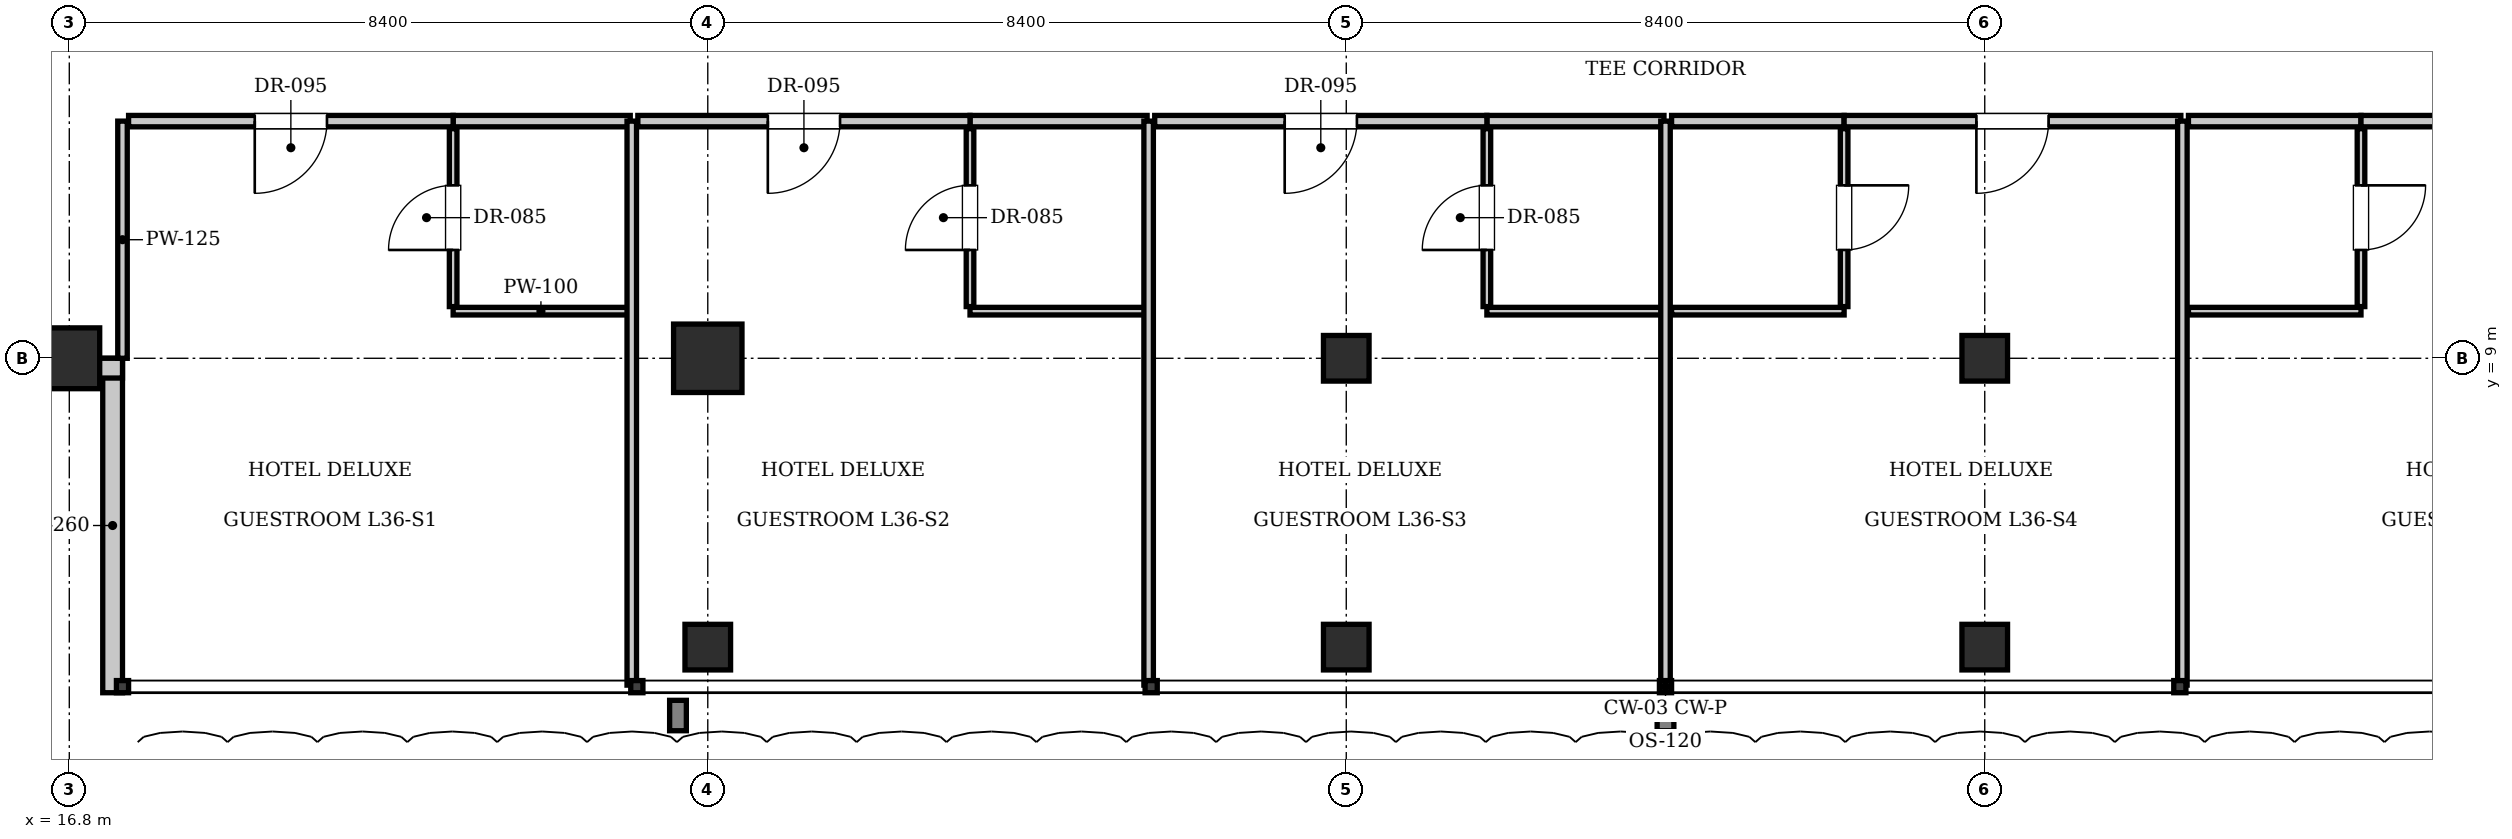
"""IFC4 building model, lengths in metres.
Left out: names, types, materials, properties, quantities, classifications, styles, units other than length and angle.
Written with IfcOpenShell. Run it as: python <this file> out.ifc"""

import sys

from ifc_helpers import new_model, si_unit, direction, frame, frame_2d, origin, origin_2d, place, context, subcontext, project, spatial, rectangle, i_section, extrude, element, fill, save


model = new_model("IFC4")
c1 = context("Model", 3, precision=1e-05, world=origin(), true_north=direction((0.0, 1.0)))
c2 = subcontext(c1, "Body", "Model", "MODEL_VIEW")
j1 = project(units=[si_unit("LENGTHUNIT", "METRE"), si_unit("PLANEANGLEUNIT", "RADIAN")], contexts=[c1])
p1 = place(None, origin())
s1 = spatial("IfcSite", under=j1, at=p1, CompositionType="ELEMENT")
p2 = place(p1, origin())
s2 = spatial("IfcBuilding", under=s1, at=p2, CompositionType="ELEMENT")
p3 = place(p2, frame((0.0, 0.0, 150.5)))
s3 = spatial("IfcBuildingStorey", under=s2, at=p3, CompositionType="ELEMENT", Elevation=150.5)
p4 = place(p3, frame((25.2, 9.0, 0.0), z_axis=(0.0, 0.0, 1.0), x_axis=(1.0, 0.0, 0.0)))
e1 = element("IfcColumn", 1, at=p4, inside=s3, PredefinedType="COLUMN", context=c2, shape_type="SweptSolid", body=[
    extrude(rectangle(XDim=0.9, YDim=0.9, at=origin_2d()), origin(), (0.0, 0.0, 1.0), 3.85),
])
for number, where, z_axis, x_axis in (
    (2, (33.6, 9.0, 0.0), (0.0, 0.0, 1.0), (1.0, 0.0, 0.0)),
    (3, (42.0, 9.0, 0.0), (0.0, 0.0, 1.0), (1.0, 0.0, 0.0)),
):
    element("IfcColumn", number, at=place(p3, frame(where, z_axis=z_axis, x_axis=x_axis)), inside=s3, PredefinedType="COLUMN", context=c2, shape_type="SweptSolid", body=[
        extrude(i_section(OverallWidth=0.6, OverallDepth=0.6, WebThickness=0.025, FlangeThickness=0.038, at=origin_2d()), origin(), (0.0, 0.0, 1.0), 3.85),
    ])
p5 = place(p3, frame((16.8, 9.0, 0.0), z_axis=(0.0, 0.0, 1.0), x_axis=(1.0, 0.0, 0.0)))
e4 = element("IfcColumn", 4, at=p5, inside=s3, PredefinedType="COLUMN", context=c2, shape_type="SweptSolid", body=[
    extrude(rectangle(XDim=0.8, YDim=0.8, at=origin_2d()), origin(), (0.0, 0.0, 1.0), 3.85),
])
for number, where, z_axis, x_axis in (
    (5, (25.2, 5.2, 0.0), (0.0, 0.0, 1.0), (1.0, 0.0, 0.0)),
    (6, (33.6, 5.2, 0.0), (0.0, 0.0, 1.0), (1.0, 0.0, 0.0)),
    (7, (42.0, 5.2, 0.0), (0.0, 0.0, 1.0), (1.0, 0.0, 0.0)),
):
    element("IfcColumn", number, at=place(p3, frame(where, z_axis=z_axis, x_axis=x_axis)), inside=s3, PredefinedType="COLUMN", context=c2, shape_type="SweptSolid", body=[
        extrude(i_section(OverallWidth=0.6, OverallDepth=0.6, WebThickness=0.025, FlangeThickness=0.038, at=origin_2d()), origin(), (0.0, 0.0, 1.0), 3.85),
    ])
p6 = place(p3, frame((17.37, 4.6, 0.0), z_axis=(0.0, 0.0, 1.0), x_axis=(0.0, 1.0, 0.0)))
e8 = element("IfcWall", 8, at=p6, inside=s3, PredefinedType="SOLIDWALL", context=c2, shape_type="SweptSolid", body=[
    extrude(rectangle(XDim=4.4, YDim=0.26, at=frame_2d((2.2, 0.0))), origin(), (0.0, 0.0, 1.0), 3.61),
])
p7 = place(p3, frame((17.5, 8.87, 0.0), z_axis=(0.0, 0.0, 1.0), x_axis=(-1.0, 0.0, 0.0)))
e9 = element("IfcWall", 9, at=p7, inside=s3, PredefinedType="SOLIDWALL", context=c2, shape_type="SweptSolid", body=[
    extrude(rectangle(XDim=4.4, YDim=0.26, at=frame_2d((2.2, 0.0))), origin(), (0.0, 0.0, 1.0), 2.998),
])
p8 = place(p3, frame((17.5, 9.0, 0.0), z_axis=(0.0, 0.0, 1.0), x_axis=(0.0, 1.0, 0.0)))
e10 = element("IfcWall", 10, at=p8, inside=s3, PredefinedType="PARTITIONING", context=c2, shape_type="SweptSolid", body=[
    extrude(rectangle(XDim=3.12, YDim=0.125, at=frame_2d((1.56, 0.0))), origin(), (0.0, 0.0, 1.0), 3.61),
])
p9 = place(p3, frame((21.85, 12.12, 0.0), z_axis=(0.0, 0.0, 1.0), x_axis=(1.0, 0.0, 0.0)))
e11 = element("IfcWall", 11, at=p9, inside=s3, PredefinedType="PARTITIONING", context=c2, shape_type="SweptSolid", body=[
    extrude(rectangle(XDim=2.33, YDim=0.15, at=frame_2d((1.165, 0.0))), origin(), (0.0, 0.0, 1.0), 3.61),
])
p10 = place(p3, frame((21.85, 9.62, 0.0), z_axis=(0.0, 0.0, 1.0), x_axis=(1.0, 0.0, 0.0)))
e12 = element("IfcWall", 12, at=p10, inside=s3, PredefinedType="PARTITIONING", context=c2, shape_type="SweptSolid", body=[
    extrude(rectangle(XDim=2.31, YDim=0.1, at=frame_2d((1.155, 0.0))), origin(), (0.0, 0.0, 1.0), 3.61),
])
p11 = place(p3, frame((21.85, 9.68, 0.0), z_axis=(0.0, 0.0, 1.0), x_axis=(0.0, 1.0, 0.0)))
e13 = element("IfcWall", 13, at=p11, inside=s3, PredefinedType="PARTITIONING", context=c2, shape_type="SweptSolid", body=[
    extrude(rectangle(XDim=2.34, YDim=0.1, at=frame_2d((1.17, 0.0))), origin(), (0.0, 0.0, 1.0), 3.61),
])
p12 = place(p11, frame((0.745, 0.0, 0.0)))
e14 = element("IfcOpeningElement", 14, at=p12, cuts=e13, PredefinedType="OPENING", context=c2, shape_type="SweptSolid", body=[
    extrude(rectangle(XDim=0.85, YDim=2.1, at=frame_2d((0.425, 1.05))), frame((0.0, 0.06, 0.0), z_axis=(0.0, -1.0, 0.0), x_axis=(1.0, 0.0, 0.0)), (0.0, 0.0, 1.0), 0.12),
])
p13 = place(p3, frame((17.58, 12.12, 0.0), z_axis=(0.0, 0.0, 1.0), x_axis=(1.0, 0.0, 0.0)))
e15 = element("IfcWall", 15, at=p13, inside=s3, PredefinedType="PARTITIONING", context=c2, shape_type="SweptSolid", body=[
    extrude(rectangle(XDim=4.27, YDim=0.15, at=frame_2d((2.135, 0.0))), origin(), (0.0, 0.0, 1.0), 3.61),
])
p14 = place(p13, frame((1.66, 0.0, 0.0)))
e16 = element("IfcOpeningElement", 16, at=p14, cuts=e15, PredefinedType="OPENING", context=c2, shape_type="SweptSolid", body=[
    extrude(rectangle(XDim=0.95, YDim=2.15, at=frame_2d((0.475, 1.075))), frame((0.0, 0.085, 0.0), z_axis=(0.0, -1.0, 0.0), x_axis=(1.0, 0.0, 0.0)), (0.0, 0.0, 1.0), 0.17),
])
p15 = place(p3, frame((24.2, 4.7, 0.0), z_axis=(0.0, 0.0, 1.0), x_axis=(0.0, 1.0, 0.0)))
e17 = element("IfcWall", 17, at=p15, inside=s3, PredefinedType="PARTITIONING", context=c2, shape_type="SweptSolid", body=[
    extrude(rectangle(XDim=7.42, YDim=0.125, at=frame_2d((3.71, 0.0))), origin(), (0.0, 0.0, 1.0), 3.61),
])
p16 = place(p3, frame((28.65, 12.12, 0.0), z_axis=(0.0, 0.0, 1.0), x_axis=(1.0, 0.0, 0.0)))
e18 = element("IfcWall", 18, at=p16, inside=s3, PredefinedType="PARTITIONING", context=c2, shape_type="SweptSolid", body=[
    extrude(rectangle(XDim=2.33, YDim=0.15, at=frame_2d((1.165, 0.0))), origin(), (0.0, 0.0, 1.0), 3.61),
])
p17 = place(p3, frame((28.65, 9.62, 0.0), z_axis=(0.0, 0.0, 1.0), x_axis=(1.0, 0.0, 0.0)))
e19 = element("IfcWall", 19, at=p17, inside=s3, PredefinedType="PARTITIONING", context=c2, shape_type="SweptSolid", body=[
    extrude(rectangle(XDim=2.31, YDim=0.1, at=frame_2d((1.155, 0.0))), origin(), (0.0, 0.0, 1.0), 3.61),
])
p18 = place(p3, frame((28.65, 9.68, 0.0), z_axis=(0.0, 0.0, 1.0), x_axis=(0.0, 1.0, 0.0)))
e20 = element("IfcWall", 20, at=p18, inside=s3, PredefinedType="PARTITIONING", context=c2, shape_type="SweptSolid", body=[
    extrude(rectangle(XDim=2.34, YDim=0.1, at=frame_2d((1.17, 0.0))), origin(), (0.0, 0.0, 1.0), 3.61),
])
p19 = place(p18, frame((0.745, 0.0, 0.0)))
e21 = element("IfcOpeningElement", 21, at=p19, cuts=e20, PredefinedType="OPENING", context=c2, shape_type="SweptSolid", body=[
    extrude(rectangle(XDim=0.85, YDim=2.1, at=frame_2d((0.425, 1.05))), frame((0.0, 0.06, 0.0), z_axis=(0.0, -1.0, 0.0), x_axis=(1.0, 0.0, 0.0)), (0.0, 0.0, 1.0), 0.12),
])
p20 = place(p3, frame((24.28, 12.12, 0.0), z_axis=(0.0, 0.0, 1.0), x_axis=(1.0, 0.0, 0.0)))
e22 = element("IfcWall", 22, at=p20, inside=s3, PredefinedType="PARTITIONING", context=c2, shape_type="SweptSolid", body=[
    extrude(rectangle(XDim=4.37, YDim=0.15, at=frame_2d((2.185, 0.0))), origin(), (0.0, 0.0, 1.0), 3.61),
])
p21 = place(p20, frame((1.71, 0.0, 0.0)))
e23 = element("IfcOpeningElement", 23, at=p21, cuts=e22, PredefinedType="OPENING", context=c2, shape_type="SweptSolid", body=[
    extrude(rectangle(XDim=0.95, YDim=2.15, at=frame_2d((0.475, 1.075))), frame((0.0, 0.085, 0.0), z_axis=(0.0, -1.0, 0.0), x_axis=(1.0, 0.0, 0.0)), (0.0, 0.0, 1.0), 0.17),
])
p22 = place(p3, frame((31.0, 4.7, 0.0), z_axis=(0.0, 0.0, 1.0), x_axis=(0.0, 1.0, 0.0)))
e24 = element("IfcWall", 24, at=p22, inside=s3, PredefinedType="PARTITIONING", context=c2, shape_type="SweptSolid", body=[
    extrude(rectangle(XDim=7.42, YDim=0.125, at=frame_2d((3.71, 0.0))), origin(), (0.0, 0.0, 1.0), 3.61),
])
p23 = place(p3, frame((35.45, 12.12, 0.0), z_axis=(0.0, 0.0, 1.0), x_axis=(1.0, 0.0, 0.0)))
e25 = element("IfcWall", 25, at=p23, inside=s3, PredefinedType="PARTITIONING", context=c2, shape_type="SweptSolid", body=[
    extrude(rectangle(XDim=2.33, YDim=0.15, at=frame_2d((1.165, 0.0))), origin(), (0.0, 0.0, 1.0), 3.61),
])
p24 = place(p3, frame((35.45, 9.62, 0.0), z_axis=(0.0, 0.0, 1.0), x_axis=(1.0, 0.0, 0.0)))
e26 = element("IfcWall", 26, at=p24, inside=s3, PredefinedType="PARTITIONING", context=c2, shape_type="SweptSolid", body=[
    extrude(rectangle(XDim=2.31, YDim=0.1, at=frame_2d((1.155, 0.0))), origin(), (0.0, 0.0, 1.0), 3.61),
])
p25 = place(p3, frame((35.45, 9.68, 0.0), z_axis=(0.0, 0.0, 1.0), x_axis=(0.0, 1.0, 0.0)))
e27 = element("IfcWall", 27, at=p25, inside=s3, PredefinedType="PARTITIONING", context=c2, shape_type="SweptSolid", body=[
    extrude(rectangle(XDim=2.34, YDim=0.1, at=frame_2d((1.17, 0.0))), origin(), (0.0, 0.0, 1.0), 3.61),
])
p26 = place(p25, frame((0.745, 0.0, 0.0)))
e28 = element("IfcOpeningElement", 28, at=p26, cuts=e27, PredefinedType="OPENING", context=c2, shape_type="SweptSolid", body=[
    extrude(rectangle(XDim=0.85, YDim=2.1, at=frame_2d((0.425, 1.05))), frame((0.0, 0.06, 0.0), z_axis=(0.0, -1.0, 0.0), x_axis=(1.0, 0.0, 0.0)), (0.0, 0.0, 1.0), 0.12),
])
p27 = place(p3, frame((31.08, 12.12, 0.0), z_axis=(0.0, 0.0, 1.0), x_axis=(1.0, 0.0, 0.0)))
e29 = element("IfcWall", 29, at=p27, inside=s3, PredefinedType="PARTITIONING", context=c2, shape_type="SweptSolid", body=[
    extrude(rectangle(XDim=4.37, YDim=0.15, at=frame_2d((2.185, 0.0))), origin(), (0.0, 0.0, 1.0), 3.61),
])
p28 = place(p27, frame((1.71, 0.0, 0.0)))
e30 = element("IfcOpeningElement", 30, at=p28, cuts=e29, PredefinedType="OPENING", context=c2, shape_type="SweptSolid", body=[
    extrude(rectangle(XDim=0.95, YDim=2.15, at=frame_2d((0.475, 1.075))), frame((0.0, 0.085, 0.0), z_axis=(0.0, -1.0, 0.0), x_axis=(1.0, 0.0, 0.0)), (0.0, 0.0, 1.0), 0.17),
])
p29 = place(p3, frame((37.8, 4.7, 0.0), z_axis=(0.0, 0.0, 1.0), x_axis=(0.0, 1.0, 0.0)))
e31 = element("IfcWall", 31, at=p29, inside=s3, PredefinedType="PARTITIONING", context=c2, shape_type="SweptSolid", body=[
    extrude(rectangle(XDim=7.42, YDim=0.125, at=frame_2d((3.71, 0.0))), origin(), (0.0, 0.0, 1.0), 3.293),
])
p30 = place(p3, frame((37.88, 12.12, 0.0), z_axis=(0.0, 0.0, 1.0), x_axis=(1.0, 0.0, 0.0)))
e32 = element("IfcWall", 32, at=p30, inside=s3, PredefinedType="PARTITIONING", context=c2, shape_type="SweptSolid", body=[
    extrude(rectangle(XDim=2.27, YDim=0.15, at=frame_2d((1.135, 0.0))), origin(), (0.0, 0.0, 1.0), 3.61),
])
p31 = place(p3, frame((37.88, 9.62, 0.0), z_axis=(0.0, 0.0, 1.0), x_axis=(1.0, 0.0, 0.0)))
e33 = element("IfcWall", 33, at=p31, inside=s3, PredefinedType="PARTITIONING", context=c2, shape_type="SweptSolid", body=[
    extrude(rectangle(XDim=2.27, YDim=0.1, at=frame_2d((1.135, 0.0))), origin(), (0.0, 0.0, 1.0), 3.61),
])
p32 = place(p3, frame((40.15, 9.68, 0.0), z_axis=(0.0, 0.0, 1.0), x_axis=(0.0, 1.0, 0.0)))
e34 = element("IfcWall", 34, at=p32, inside=s3, PredefinedType="PARTITIONING", context=c2, shape_type="SweptSolid", body=[
    extrude(rectangle(XDim=2.34, YDim=0.1, at=frame_2d((1.17, 0.0))), origin(), (0.0, 0.0, 1.0), 3.61),
])
p33 = place(p32, frame((0.745, 0.0, 0.0)))
e35 = element("IfcOpeningElement", 35, at=p33, cuts=e34, PredefinedType="OPENING", context=c2, shape_type="SweptSolid", body=[
    extrude(rectangle(XDim=0.85, YDim=2.1, at=frame_2d((0.425, 1.05))), frame((0.0, 0.06, 0.0), z_axis=(0.0, -1.0, 0.0), x_axis=(1.0, 0.0, 0.0)), (0.0, 0.0, 1.0), 0.12),
])
p34 = place(p3, frame((40.15, 12.12, 0.0), z_axis=(0.0, 0.0, 1.0), x_axis=(1.0, 0.0, 0.0)))
e36 = element("IfcWall", 36, at=p34, inside=s3, PredefinedType="PARTITIONING", context=c2, shape_type="SweptSolid", body=[
    extrude(rectangle(XDim=4.43, YDim=0.15, at=frame_2d((2.215, 0.0))), origin(), (0.0, 0.0, 1.0), 3.61),
])
p35 = place(p34, frame((1.74, 0.0, 0.0)))
e37 = element("IfcOpeningElement", 37, at=p35, cuts=e36, PredefinedType="OPENING", context=c2, shape_type="SweptSolid", body=[
    extrude(rectangle(XDim=0.95, YDim=2.15, at=frame_2d((0.475, 1.075))), frame((0.0, 0.085, 0.0), z_axis=(0.0, -1.0, 0.0), x_axis=(1.0, 0.0, 0.0)), (0.0, 0.0, 1.0), 0.17),
])
p36 = place(p3, frame((44.6, 4.7, 0.0), z_axis=(0.0, 0.0, 1.0), x_axis=(0.0, 1.0, 0.0)))
e38 = element("IfcWall", 38, at=p36, inside=s3, PredefinedType="PARTITIONING", context=c2, shape_type="SweptSolid", body=[
    extrude(rectangle(XDim=7.42, YDim=0.125, at=frame_2d((3.71, 0.0))), origin(), (0.0, 0.0, 1.0), 3.61),
])
p37 = place(p3, frame((44.68, 12.12, 0.0), z_axis=(0.0, 0.0, 1.0), x_axis=(1.0, 0.0, 0.0)))
e39 = element("IfcWall", 39, at=p37, inside=s3, PredefinedType="PARTITIONING", context=c2, shape_type="SweptSolid", body=[
    extrude(rectangle(XDim=2.27, YDim=0.15, at=frame_2d((1.135, 0.0))), origin(), (0.0, 0.0, 1.0), 3.61),
])
p38 = place(p3, frame((44.68, 9.62, 0.0), z_axis=(0.0, 0.0, 1.0), x_axis=(1.0, 0.0, 0.0)))
e40 = element("IfcWall", 40, at=p38, inside=s3, PredefinedType="PARTITIONING", context=c2, shape_type="SweptSolid", body=[
    extrude(rectangle(XDim=2.27, YDim=0.1, at=frame_2d((1.135, 0.0))), origin(), (0.0, 0.0, 1.0), 3.61),
])
p39 = place(p3, frame((46.95, 9.68, 0.0), z_axis=(0.0, 0.0, 1.0), x_axis=(0.0, 1.0, 0.0)))
e41 = element("IfcWall", 41, at=p39, inside=s3, PredefinedType="PARTITIONING", context=c2, shape_type="SweptSolid", body=[
    extrude(rectangle(XDim=2.34, YDim=0.1, at=frame_2d((1.17, 0.0))), origin(), (0.0, 0.0, 1.0), 3.61),
])
p40 = place(p39, frame((0.745, 0.0, 0.0)))
e42 = element("IfcOpeningElement", 42, at=p40, cuts=e41, PredefinedType="OPENING", context=c2, shape_type="SweptSolid", body=[
    extrude(rectangle(XDim=0.85, YDim=2.1, at=frame_2d((0.425, 1.05))), frame((0.0, 0.06, 0.0), z_axis=(0.0, -1.0, 0.0), x_axis=(1.0, 0.0, 0.0)), (0.0, 0.0, 1.0), 0.12),
])
p41 = place(p3, frame((46.95, 12.12, 0.0), z_axis=(0.0, 0.0, 1.0), x_axis=(1.0, 0.0, 0.0)))
e43 = element("IfcWall", 43, at=p41, inside=s3, PredefinedType="PARTITIONING", context=c2, shape_type="SweptSolid", body=[
    extrude(rectangle(XDim=4.43, YDim=0.15, at=frame_2d((2.215, 0.0))), origin(), (0.0, 0.0, 1.0), 3.61),
])
p42 = place(p41, frame((1.74, 0.0, 0.0)))
e44 = element("IfcOpeningElement", 44, at=p42, cuts=e43, PredefinedType="OPENING", context=c2, shape_type="SweptSolid", body=[
    extrude(rectangle(XDim=0.95, YDim=2.15, at=frame_2d((0.475, 1.075))), frame((0.0, 0.085, 0.0), z_axis=(0.0, -1.0, 0.0), x_axis=(1.0, 0.0, 0.0)), (0.0, 0.0, 1.0), 0.17),
])
p43 = place(p12, origin())
e45 = element("IfcDoor", 45, at=p43, inside=s3, OperationType="SINGLE_SWING_LEFT", PredefinedType="DOOR", context=c2, shape_type="SweptSolid", body=[
    extrude(rectangle(XDim=0.85, YDim=2.1, at=frame_2d((0.425, 1.05))), frame((0.0, 0.025, 0.0), z_axis=(0.0, -1.0, 0.0), x_axis=(1.0, 0.0, 0.0)), (0.0, 0.0, 1.0), 0.05),
])
fill(e14, e45)
p44 = place(p14, frame((0.95, 0.0, 0.0), z_axis=(0.0, 0.0, 1.0), x_axis=(-1.0, 0.0, 0.0)))
e46 = element("IfcDoor", 46, at=p44, inside=s3, OperationType="SINGLE_SWING_RIGHT", PredefinedType="DOOR", context=c2, shape_type="SweptSolid", body=[
    extrude(rectangle(XDim=0.95, YDim=2.15, at=frame_2d((0.475, 1.075))), frame((0.0, 0.025, 0.0), z_axis=(0.0, -1.0, 0.0), x_axis=(1.0, 0.0, 0.0)), (0.0, 0.0, 1.0), 0.05),
])
fill(e16, e46)
p45 = place(p19, origin())
e47 = element("IfcDoor", 47, at=p45, inside=s3, OperationType="SINGLE_SWING_LEFT", PredefinedType="DOOR", context=c2, shape_type="SweptSolid", body=[
    extrude(rectangle(XDim=0.85, YDim=2.1, at=frame_2d((0.425, 1.05))), frame((0.0, 0.025, 0.0), z_axis=(0.0, -1.0, 0.0), x_axis=(1.0, 0.0, 0.0)), (0.0, 0.0, 1.0), 0.05),
])
fill(e21, e47)
p46 = place(p21, frame((0.95, 0.0, 0.0), z_axis=(0.0, 0.0, 1.0), x_axis=(-1.0, 0.0, 0.0)))
e48 = element("IfcDoor", 48, at=p46, inside=s3, OperationType="SINGLE_SWING_RIGHT", PredefinedType="DOOR", context=c2, shape_type="SweptSolid", body=[
    extrude(rectangle(XDim=0.95, YDim=2.15, at=frame_2d((0.475, 1.075))), frame((0.0, 0.025, 0.0), z_axis=(0.0, -1.0, 0.0), x_axis=(1.0, 0.0, 0.0)), (0.0, 0.0, 1.0), 0.05),
])
fill(e23, e48)
p47 = place(p26, origin())
e49 = element("IfcDoor", 49, at=p47, inside=s3, OperationType="SINGLE_SWING_LEFT", PredefinedType="DOOR", context=c2, shape_type="SweptSolid", body=[
    extrude(rectangle(XDim=0.85, YDim=2.1, at=frame_2d((0.425, 1.05))), frame((0.0, 0.025, 0.0), z_axis=(0.0, -1.0, 0.0), x_axis=(1.0, 0.0, 0.0)), (0.0, 0.0, 1.0), 0.05),
])
fill(e28, e49)
p48 = place(p28, frame((0.95, 0.0, 0.0), z_axis=(0.0, 0.0, 1.0), x_axis=(-1.0, 0.0, 0.0)))
e50 = element("IfcDoor", 50, at=p48, inside=s3, OperationType="SINGLE_SWING_RIGHT", PredefinedType="DOOR", context=c2, shape_type="SweptSolid", body=[
    extrude(rectangle(XDim=0.95, YDim=2.15, at=frame_2d((0.475, 1.075))), frame((0.0, 0.025, 0.0), z_axis=(0.0, -1.0, 0.0), x_axis=(1.0, 0.0, 0.0)), (0.0, 0.0, 1.0), 0.05),
])
fill(e30, e50)
p49 = place(p33, frame((0.85, 0.0, 0.0), z_axis=(0.0, 0.0, 1.0), x_axis=(-1.0, 0.0, 0.0)))
e51 = element("IfcDoor", 51, at=p49, inside=s3, OperationType="SINGLE_SWING_LEFT", PredefinedType="DOOR", context=c2, shape_type="SweptSolid", body=[
    extrude(rectangle(XDim=0.85, YDim=2.1, at=frame_2d((0.425, 1.05))), frame((0.0, 0.025, 0.0), z_axis=(0.0, -1.0, 0.0), x_axis=(1.0, 0.0, 0.0)), (0.0, 0.0, 1.0), 0.05),
])
fill(e35, e51)
p50 = place(p35, frame((0.95, 0.0, 0.0), z_axis=(0.0, 0.0, 1.0), x_axis=(-1.0, 0.0, 0.0)))
e52 = element("IfcDoor", 52, at=p50, inside=s3, OperationType="SINGLE_SWING_RIGHT", PredefinedType="DOOR", context=c2, shape_type="SweptSolid", body=[
    extrude(rectangle(XDim=0.95, YDim=2.15, at=frame_2d((0.475, 1.075))), frame((0.0, 0.025, 0.0), z_axis=(0.0, -1.0, 0.0), x_axis=(1.0, 0.0, 0.0)), (0.0, 0.0, 1.0), 0.05),
])
fill(e37, e52)
p51 = place(p40, frame((0.85, 0.0, 0.0), z_axis=(0.0, 0.0, 1.0), x_axis=(-1.0, 0.0, 0.0)))
e53 = element("IfcDoor", 53, at=p51, inside=s3, OperationType="SINGLE_SWING_LEFT", PredefinedType="DOOR", context=c2, shape_type="SweptSolid", body=[
    extrude(rectangle(XDim=0.85, YDim=2.1, at=frame_2d((0.425, 1.05))), frame((0.0, 0.025, 0.0), z_axis=(0.0, -1.0, 0.0), x_axis=(1.0, 0.0, 0.0)), (0.0, 0.0, 1.0), 0.05),
])
fill(e42, e53)
save(model, sys.argv[1])
